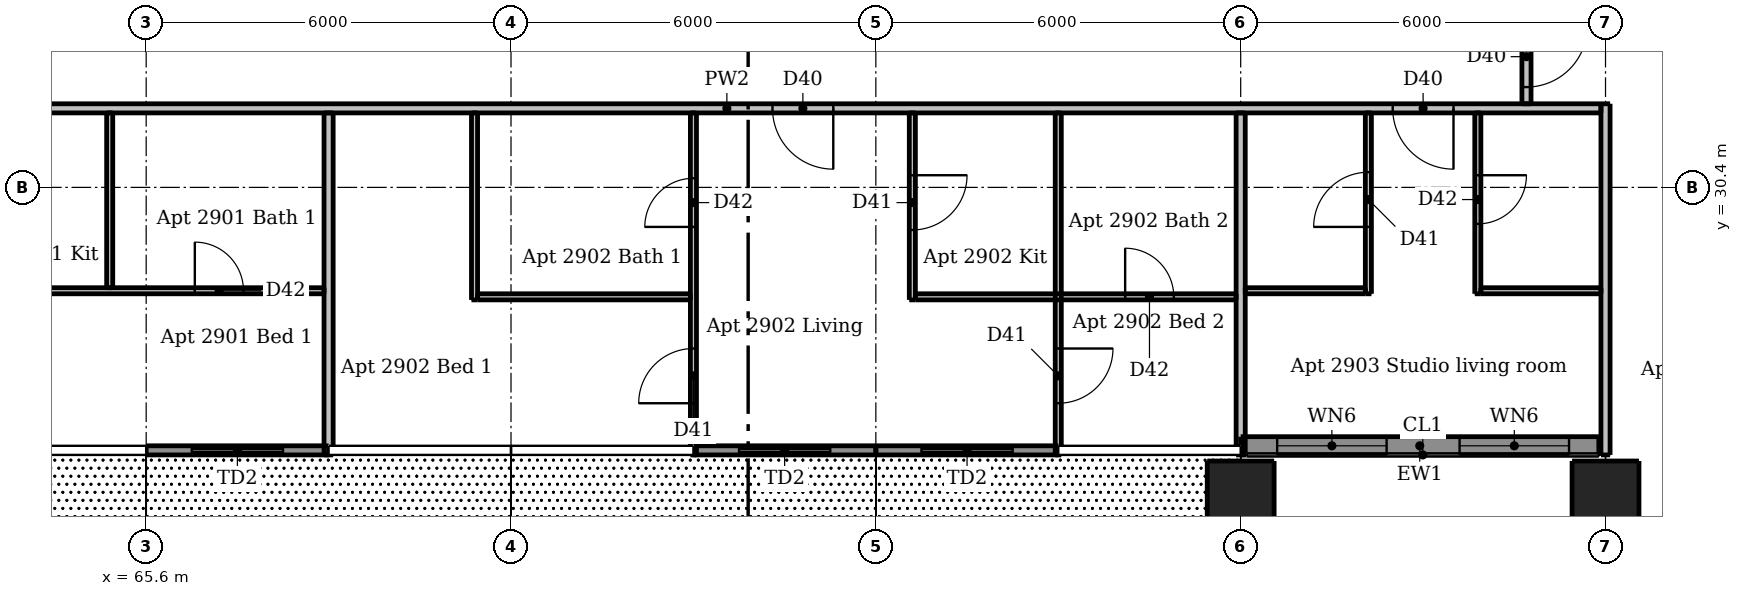
"""IFC4 building model, lengths in metres.
Left out: names, types, materials, properties, quantities, classifications, styles, units other than length and angle.
Written with IfcOpenShell. Run it as: python <this file> out.ifc"""

import sys

from ifc_helpers import new_model, si_unit, direction, frame, frame_2d, origin, origin_2d, place, context, subcontext, project, spatial, rectangle, extrude, element, fill, save


model = new_model("IFC4")
c1 = context("Model", 3, precision=1e-05, world=origin(), true_north=direction((0.0, 1.0)))
c2 = subcontext(c1, "Body", "Model", "MODEL_VIEW")
j1 = project(units=[si_unit("LENGTHUNIT", "METRE"), si_unit("PLANEANGLEUNIT", "RADIAN")], contexts=[c1])
p1 = place(None, origin())
s1 = spatial("IfcSite", under=j1, at=p1, CompositionType="ELEMENT")
p2 = place(p1, origin())
s2 = spatial("IfcBuilding", under=s1, at=p2, CompositionType="ELEMENT")
p3 = place(p2, frame((0.0, 0.0, 108.4)))
s3 = spatial("IfcBuildingStorey", under=s2, at=p3, CompositionType="ELEMENT", Elevation=108.4)
p4 = place(p3, frame((83.6, 25.35, 0.0), z_axis=(0.0, 0.0, 1.0), x_axis=(1.0, 0.0, 0.0)))
e1 = element("IfcColumn", 1, at=p4, inside=s3, PredefinedType="COLUMN", context=c2, shape_type="SweptSolid", body=[
    extrude(rectangle(XDim=1.1, YDim=1.1, at=origin_2d()), origin(), (0.0, 0.0, 1.0), 3.3),
])
p5 = place(p3, frame((89.6, 25.35, 0.0), z_axis=(0.0, 0.0, 1.0), x_axis=(1.0, 0.0, 0.0)))
e2 = element("IfcColumn", 2, at=p5, inside=s3, PredefinedType="COLUMN", context=c2, shape_type="SweptSolid", body=[
    extrude(rectangle(XDim=1.1, YDim=1.1, at=origin_2d()), origin(), (0.0, 0.0, 1.0), 3.05),
])
p6 = place(p3, frame((65.6, 26.075, 0.0), z_axis=(0.0, 0.0, 1.0), x_axis=(1.0, 0.0, 0.0)))
e3 = element("IfcWall", 3, at=p6, inside=s3, PredefinedType="SOLIDWALL", context=c2, shape_type="SweptSolid", body=[
    extrude(rectangle(XDim=3.0, YDim=0.15, at=frame_2d((1.5, 0.0))), origin(), (0.0, 0.0, 1.0), 3.05),
])
p7 = place(p6, frame((0.75, 0.0, 0.0)))
e4 = element("IfcOpeningElement", 4, at=p7, cuts=e3, PredefinedType="OPENING", context=c2, shape_type="SweptSolid", body=[
    extrude(rectangle(XDim=1.5, YDim=2.4, at=frame_2d((0.75, 1.2))), frame((0.0, 0.085, 0.0), z_axis=(0.0, -1.0, 0.0), x_axis=(1.0, 0.0, 0.0)), (0.0, 0.0, 1.0), 0.17),
])
p8 = place(p3, frame((74.6, 26.075, 0.0), z_axis=(0.0, 0.0, 1.0), x_axis=(1.0, 0.0, 0.0)))
e5 = element("IfcWall", 5, at=p8, inside=s3, PredefinedType="SOLIDWALL", context=c2, shape_type="SweptSolid", body=[
    extrude(rectangle(XDim=3.0, YDim=0.15, at=frame_2d((1.5, 0.0))), origin(), (0.0, 0.0, 1.0), 3.05),
])
p9 = place(p8, frame((0.75, 0.0, 0.0)))
e6 = element("IfcOpeningElement", 6, at=p9, cuts=e5, PredefinedType="OPENING", context=c2, shape_type="SweptSolid", body=[
    extrude(rectangle(XDim=1.5, YDim=2.4, at=frame_2d((0.75, 1.2))), frame((0.0, 0.085, 0.0), z_axis=(0.0, -1.0, 0.0), x_axis=(1.0, 0.0, 0.0)), (0.0, 0.0, 1.0), 0.17),
])
p10 = place(p3, frame((77.6, 26.075, 0.0), z_axis=(0.0, 0.0, 1.0), x_axis=(1.0, 0.0, 0.0)))
e7 = element("IfcWall", 7, at=p10, inside=s3, PredefinedType="SOLIDWALL", context=c2, shape_type="SweptSolid", body=[
    extrude(rectangle(XDim=3.0, YDim=0.15, at=frame_2d((1.5, 0.0))), origin(), (0.0, 0.0, 1.0), 3.05),
])
p11 = place(p10, frame((0.75, 0.0, 0.0)))
e8 = element("IfcOpeningElement", 8, at=p11, cuts=e7, PredefinedType="OPENING", context=c2, shape_type="SweptSolid", body=[
    extrude(rectangle(XDim=1.5, YDim=2.4, at=frame_2d((0.75, 1.2))), frame((0.0, 0.085, 0.0), z_axis=(0.0, -1.0, 0.0), x_axis=(1.0, 0.0, 0.0)), (0.0, 0.0, 1.0), 0.17),
])
p12 = place(p3, frame((83.6, 26.15, 0.0), z_axis=(0.0, 0.0, 1.0), x_axis=(1.0, 0.0, 0.0)))
e9 = element("IfcWall", 9, at=p12, inside=s3, PredefinedType="SOLIDWALL", context=c2, shape_type="SweptSolid", body=[
    extrude(rectangle(XDim=5.89, YDim=0.3, at=frame_2d((2.945, 0.0))), origin(), (0.0, 0.0, 1.0), 3.05),
])
p13 = place(p12, frame((0.6, 0.0, 0.15)))
e10 = element("IfcOpeningElement", 10, at=p13, cuts=e9, PredefinedType="OPENING", context=c2, shape_type="SweptSolid", body=[
    extrude(rectangle(XDim=1.8, YDim=2.1, at=frame_2d((0.9, 1.05))), frame((0.0, 0.16, 0.0), z_axis=(0.0, -1.0, 0.0), x_axis=(1.0, 0.0, 0.0)), (0.0, 0.0, 1.0), 0.32),
])
p14 = place(p12, frame((3.6, 0.0, 0.15)))
e11 = element("IfcOpeningElement", 11, at=p14, cuts=e9, PredefinedType="OPENING", context=c2, shape_type="SweptSolid", body=[
    extrude(rectangle(XDim=1.8, YDim=2.1, at=frame_2d((0.9, 1.05))), frame((0.0, 0.16, 0.0), z_axis=(0.0, -1.0, 0.0), x_axis=(1.0, 0.0, 0.0)), (0.0, 0.0, 1.0), 0.32),
])
p15 = place(p3, frame((65.0, 28.75, 0.0), z_axis=(0.0, 0.0, 1.0), x_axis=(0.0, 1.0, 0.0)))
e12 = element("IfcWall", 12, at=p15, inside=s3, PredefinedType="PARTITIONING", context=c2, shape_type="SweptSolid", body=[
    extrude(rectangle(XDim=2.875, YDim=0.1, at=frame_2d((1.438, 0.0))), origin(), (0.0, 0.0, 1.0), 3.05),
])
p16 = place(p3, frame((71.0, 28.55, 0.0), z_axis=(0.0, 0.0, 1.0), x_axis=(0.0, 1.0, 0.0)))
e13 = element("IfcWall", 13, at=p16, inside=s3, PredefinedType="PARTITIONING", context=c2, shape_type="SweptSolid", body=[
    extrude(rectangle(XDim=3.075, YDim=0.1, at=frame_2d((1.538, 0.0))), origin(), (0.0, 0.0, 1.0), 3.05),
])
p17 = place(p3, frame((74.6, 26.0, 0.0), z_axis=(0.0, 0.0, 1.0), x_axis=(0.0, 1.0, 0.0)))
e14 = element("IfcWall", 14, at=p17, inside=s3, PredefinedType="PARTITIONING", context=c2, shape_type="SweptSolid", body=[
    extrude(rectangle(XDim=5.625, YDim=0.1, at=frame_2d((2.812, 0.0))), origin(), (0.0, 0.0, 1.0), 3.05),
])
p18 = place(p17, frame((0.85, 0.0, 0.0)))
e15 = element("IfcOpeningElement", 15, at=p18, cuts=e14, PredefinedType="OPENING", context=c2, shape_type="SweptSolid", body=[
    extrude(rectangle(XDim=0.9, YDim=2.1, at=frame_2d((0.45, 1.05))), frame((0.0, 0.06, 0.0), z_axis=(0.0, -1.0, 0.0), x_axis=(1.0, 0.0, 0.0)), (0.0, 0.0, 1.0), 0.12),
])
p19 = place(p17, frame((3.75, 0.0, 0.0)))
e16 = element("IfcOpeningElement", 16, at=p19, cuts=e14, PredefinedType="OPENING", context=c2, shape_type="SweptSolid", body=[
    extrude(rectangle(XDim=0.8, YDim=2.1, at=frame_2d((0.4, 1.05))), frame((0.0, 0.06, 0.0), z_axis=(0.0, -1.0, 0.0), x_axis=(1.0, 0.0, 0.0)), (0.0, 0.0, 1.0), 0.12),
])
p20 = place(p3, frame((78.2, 31.625, 0.0), z_axis=(0.0, 0.0, 1.0), x_axis=(0.0, -1.0, 0.0)))
e17 = element("IfcWall", 17, at=p20, inside=s3, PredefinedType="PARTITIONING", context=c2, shape_type="SweptSolid", body=[
    extrude(rectangle(XDim=3.075, YDim=0.1, at=frame_2d((1.538, 0.0))), origin(), (0.0, 0.0, 1.0), 3.05),
])
p21 = place(p20, frame((1.025, 0.0, 0.0)))
e18 = element("IfcOpeningElement", 18, at=p21, cuts=e17, PredefinedType="OPENING", context=c2, shape_type="SweptSolid", body=[
    extrude(rectangle(XDim=0.9, YDim=2.1, at=frame_2d((0.45, 1.05))), frame((0.0, 0.06, 0.0), z_axis=(0.0, -1.0, 0.0), x_axis=(1.0, 0.0, 0.0)), (0.0, 0.0, 1.0), 0.12),
])
p22 = place(p3, frame((80.6, 31.625, 0.0), z_axis=(0.0, 0.0, 1.0), x_axis=(0.0, -1.0, 0.0)))
e19 = element("IfcWall", 19, at=p22, inside=s3, PredefinedType="PARTITIONING", context=c2, shape_type="SweptSolid", body=[
    extrude(rectangle(XDim=5.625, YDim=0.1, at=frame_2d((2.812, 0.0))), origin(), (0.0, 0.0, 1.0), 3.05),
])
p23 = place(p22, frame((3.875, 0.0, 0.0)))
e20 = element("IfcOpeningElement", 20, at=p23, cuts=e19, PredefinedType="OPENING", context=c2, shape_type="SweptSolid", body=[
    extrude(rectangle(XDim=0.9, YDim=2.1, at=frame_2d((0.45, 1.05))), frame((0.0, 0.06, 0.0), z_axis=(0.0, -1.0, 0.0), x_axis=(1.0, 0.0, 0.0)), (0.0, 0.0, 1.0), 0.12),
])
p24 = place(p3, frame((85.7, 28.65, 0.0), z_axis=(0.0, 0.0, 1.0), x_axis=(0.0, 1.0, 0.0)))
e21 = element("IfcWall", 21, at=p24, inside=s3, PredefinedType="PARTITIONING", context=c2, shape_type="SweptSolid", body=[
    extrude(rectangle(XDim=2.975, YDim=0.1, at=frame_2d((1.488, 0.0))), origin(), (0.0, 0.0, 1.0), 3.05),
])
p25 = place(p24, frame((1.1, 0.0, 0.0)))
e22 = element("IfcOpeningElement", 22, at=p25, cuts=e21, PredefinedType="OPENING", context=c2, shape_type="SweptSolid", body=[
    extrude(rectangle(XDim=0.9, YDim=2.1, at=frame_2d((0.45, 1.05))), frame((0.0, 0.06, 0.0), z_axis=(0.0, -1.0, 0.0), x_axis=(1.0, 0.0, 0.0)), (0.0, 0.0, 1.0), 0.12),
])
p26 = place(p3, frame((87.5, 31.625, 0.0), z_axis=(0.0, 0.0, 1.0), x_axis=(0.0, -1.0, 0.0)))
e23 = element("IfcWall", 23, at=p26, inside=s3, PredefinedType="PARTITIONING", context=c2, shape_type="SweptSolid", body=[
    extrude(rectangle(XDim=2.975, YDim=0.1, at=frame_2d((1.488, 0.0))), origin(), (0.0, 0.0, 1.0), 3.05),
])
p27 = place(p26, frame((1.025, 0.0, 0.0)))
e24 = element("IfcOpeningElement", 24, at=p27, cuts=e23, PredefinedType="OPENING", context=c2, shape_type="SweptSolid", body=[
    extrude(rectangle(XDim=0.8, YDim=2.1, at=frame_2d((0.4, 1.05))), frame((0.0, 0.06, 0.0), z_axis=(0.0, -1.0, 0.0), x_axis=(1.0, 0.0, 0.0)), (0.0, 0.0, 1.0), 0.12),
])
p28 = place(p3, frame((62.65, 28.7, 0.0), z_axis=(0.0, 0.0, 1.0), x_axis=(1.0, 0.0, 0.0)))
e25 = element("IfcWall", 25, at=p28, inside=s3, PredefinedType="PARTITIONING", context=c2, shape_type="SweptSolid", body=[
    extrude(rectangle(XDim=5.875, YDim=0.1, at=frame_2d((2.938, 0.0))), origin(), (0.0, 0.0, 1.0), 3.05),
])
p29 = place(p28, frame((3.75, 0.0, 0.0)))
e26 = element("IfcOpeningElement", 26, at=p29, cuts=e25, PredefinedType="OPENING", context=c2, shape_type="SweptSolid", body=[
    extrude(rectangle(XDim=0.8, YDim=2.1, at=frame_2d((0.4, 1.05))), frame((0.0, 0.06, 0.0), z_axis=(0.0, -1.0, 0.0), x_axis=(1.0, 0.0, 0.0)), (0.0, 0.0, 1.0), 0.12),
])
for number, where, z_axis, x_axis in (
    (27, (83.675, 28.7, 0.0), (0.0, 0.0, 1.0), (1.0, 0.0, 0.0)),
    (28, (87.55, 28.7, 0.0), (0.0, 0.0, 1.0), (1.0, 0.0, 0.0)),
):
    element("IfcWall", number, at=place(p3, frame(where, z_axis=z_axis, x_axis=x_axis)), inside=s3, PredefinedType="PARTITIONING", context=c2, shape_type="SweptSolid", body=[
        extrude(rectangle(XDim=1.975, YDim=0.1, at=frame_2d((0.987, 0.0))), origin(), (0.0, 0.0, 1.0), 3.05),
    ])
p30 = place(p3, frame((71.05, 28.6, 0.0), z_axis=(0.0, 0.0, 1.0), x_axis=(1.0, 0.0, 0.0)))
e29 = element("IfcWall", 29, at=p30, inside=s3, PredefinedType="PARTITIONING", context=c2, shape_type="SweptSolid", body=[
    extrude(rectangle(XDim=3.5, YDim=0.1, at=frame_2d((1.75, 0.0))), origin(), (0.0, 0.0, 1.0), 3.05),
])
p31 = place(p3, frame((78.25, 28.6, 0.0), z_axis=(0.0, 0.0, 1.0), x_axis=(1.0, 0.0, 0.0)))
e30 = element("IfcWall", 30, at=p31, inside=s3, PredefinedType="PARTITIONING", context=c2, shape_type="SweptSolid", body=[
    extrude(rectangle(XDim=5.275, YDim=0.1, at=frame_2d((2.637, 0.0))), origin(), (0.0, 0.0, 1.0), 3.05),
])
p32 = place(p31, frame((3.45, 0.0, 0.0)))
e31 = element("IfcOpeningElement", 31, at=p32, cuts=e30, PredefinedType="OPENING", context=c2, shape_type="SweptSolid", body=[
    extrude(rectangle(XDim=0.8, YDim=2.1, at=frame_2d((0.4, 1.05))), frame((0.0, 0.06, 0.0), z_axis=(0.0, -1.0, 0.0), x_axis=(1.0, 0.0, 0.0)), (0.0, 0.0, 1.0), 0.12),
])
p33 = place(p3, frame((68.6, 26.0, 0.0), z_axis=(0.0, 0.0, 1.0), x_axis=(0.0, 1.0, 0.0)))
e32 = element("IfcWall", 32, at=p33, inside=s3, PredefinedType="PARTITIONING", context=c2, shape_type="SweptSolid", body=[
    extrude(rectangle(XDim=5.625, YDim=0.15, at=frame_2d((2.812, 0.0))), origin(), (0.0, 0.0, 1.0), 3.05),
])
p34 = place(p3, frame((83.6, 26.0, 0.0), z_axis=(0.0, 0.0, 1.0), x_axis=(0.0, 1.0, 0.0)))
e33 = element("IfcWall", 33, at=p34, inside=s3, PredefinedType="PARTITIONING", context=c2, shape_type="SweptSolid", body=[
    extrude(rectangle(XDim=5.625, YDim=0.15, at=frame_2d((2.812, 0.0))), origin(), (0.0, 0.0, 1.0), 2.59),
])
p35 = place(p3, frame((88.3, 60.475, 0.0), z_axis=(0.0, 0.0, 1.0), x_axis=(0.0, -1.0, 0.0)))
e34 = element("IfcWall", 34, at=p35, inside=s3, PredefinedType="PARTITIONING", context=c2, shape_type="SweptSolid", body=[
    extrude(rectangle(XDim=28.7, YDim=0.15, at=frame_2d((14.35, 0.0))), origin(), (0.0, 0.0, 1.0), 3.05),
])
p36 = place(p35, frame((27.425, 0.0, 0.0)))
e35 = element("IfcOpeningElement", 35, at=p36, cuts=e34, PredefinedType="OPENING", context=c2, shape_type="SweptSolid", body=[
    extrude(rectangle(XDim=1.0, YDim=2.1, at=frame_2d((0.5, 1.05))), frame((0.0, 0.085, 0.0), z_axis=(0.0, -1.0, 0.0), x_axis=(1.0, 0.0, 0.0)), (0.0, 0.0, 1.0), 0.17),
])
p37 = place(p35, frame((14.575, 0.0, 0.0)))
e36 = element("IfcOpeningElement", 36, at=p37, cuts=e34, PredefinedType="OPENING", context=c2, shape_type="SweptSolid", body=[
    extrude(rectangle(XDim=1.0, YDim=2.1, at=frame_2d((0.5, 1.05))), frame((0.0, 0.085, 0.0), z_axis=(0.0, -1.0, 0.0), x_axis=(1.0, 0.0, 0.0)), (0.0, 0.0, 1.0), 0.17),
])
p38 = place(p35, frame((2.575, 0.0, 0.0)))
e37 = element("IfcOpeningElement", 37, at=p38, cuts=e34, PredefinedType="OPENING", context=c2, shape_type="SweptSolid", body=[
    extrude(rectangle(XDim=1.0, YDim=2.1, at=frame_2d((0.5, 1.05))), frame((0.0, 0.085, 0.0), z_axis=(0.0, -1.0, 0.0), x_axis=(1.0, 0.0, 0.0)), (0.0, 0.0, 1.0), 0.17),
])
p39 = place(p3, frame((89.6, 26.0, 0.0), z_axis=(0.0, 0.0, 1.0), x_axis=(0.0, 1.0, 0.0)))
e38 = element("IfcWall", 38, at=p39, inside=s3, PredefinedType="PARTITIONING", context=c2, shape_type="SweptSolid", body=[
    extrude(rectangle(XDim=5.775, YDim=0.15, at=frame_2d((2.887, 0.0))), origin(), (0.0, 0.0, 1.0), 2.516),
])
p40 = place(p3, frame((89.525, 31.7, 0.0), z_axis=(0.0, 0.0, 1.0), x_axis=(-1.0, 0.0, 0.0)))
e39 = element("IfcWall", 39, at=p40, inside=s3, PredefinedType="PARTITIONING", context=c2, shape_type="SweptSolid", body=[
    extrude(rectangle(XDim=28.75, YDim=0.15, at=frame_2d((14.375, 0.0))), origin(), (0.0, 0.0, 1.0), 3.05),
])
p41 = place(p40, frame((27.375, 0.0, 0.0)))
e40 = element("IfcOpeningElement", 40, at=p41, cuts=e39, PredefinedType="OPENING", context=c2, shape_type="SweptSolid", body=[
    extrude(rectangle(XDim=1.0, YDim=2.1, at=frame_2d((0.5, 1.05))), frame((0.0, 0.085, 0.0), z_axis=(0.0, -1.0, 0.0), x_axis=(1.0, 0.0, 0.0)), (0.0, 0.0, 1.0), 0.17),
])
p42 = place(p40, frame((12.625, 0.0, 0.0)))
e41 = element("IfcOpeningElement", 41, at=p42, cuts=e39, PredefinedType="OPENING", context=c2, shape_type="SweptSolid", body=[
    extrude(rectangle(XDim=1.0, YDim=2.1, at=frame_2d((0.5, 1.05))), frame((0.0, 0.085, 0.0), z_axis=(0.0, -1.0, 0.0), x_axis=(1.0, 0.0, 0.0)), (0.0, 0.0, 1.0), 0.17),
])
p43 = place(p40, frame((2.425, 0.0, 0.0)))
e42 = element("IfcOpeningElement", 42, at=p43, cuts=e39, PredefinedType="OPENING", context=c2, shape_type="SweptSolid", body=[
    extrude(rectangle(XDim=1.0, YDim=2.1, at=frame_2d((0.5, 1.05))), frame((0.0, 0.085, 0.0), z_axis=(0.0, -1.0, 0.0), x_axis=(1.0, 0.0, 0.0)), (0.0, 0.0, 1.0), 0.17),
])
p44 = place(p7, origin())
e43 = element("IfcDoor", 43, at=p44, inside=s3, OperationType="DOUBLE_DOOR_SLIDING", PredefinedType="DOOR", context=c2, shape_type="SweptSolid", body=[
    extrude(rectangle(XDim=1.5, YDim=2.4, at=frame_2d((0.75, 1.2))), frame((0.0, 0.025, 0.0), z_axis=(0.0, -1.0, 0.0), x_axis=(1.0, 0.0, 0.0)), (0.0, 0.0, 1.0), 0.05),
])
fill(e4, e43)
p45 = place(p9, origin())
e44 = element("IfcDoor", 44, at=p45, inside=s3, OperationType="DOUBLE_DOOR_SLIDING", PredefinedType="DOOR", context=c2, shape_type="SweptSolid", body=[
    extrude(rectangle(XDim=1.5, YDim=2.4, at=frame_2d((0.75, 1.2))), frame((0.0, 0.025, 0.0), z_axis=(0.0, -1.0, 0.0), x_axis=(1.0, 0.0, 0.0)), (0.0, 0.0, 1.0), 0.05),
])
fill(e6, e44)
p46 = place(p11, origin())
e45 = element("IfcDoor", 45, at=p46, inside=s3, OperationType="DOUBLE_DOOR_SLIDING", PredefinedType="DOOR", context=c2, shape_type="SweptSolid", body=[
    extrude(rectangle(XDim=1.5, YDim=2.4, at=frame_2d((0.75, 1.2))), frame((0.0, 0.025, 0.0), z_axis=(0.0, -1.0, 0.0), x_axis=(1.0, 0.0, 0.0)), (0.0, 0.0, 1.0), 0.05),
])
fill(e8, e45)
p47 = place(p13, origin())
e46 = element("IfcWindow", 46, at=p47, inside=s3, PartitioningType="DOUBLE_PANEL_VERTICAL", PredefinedType="WINDOW", context=c2, shape_type="SweptSolid", body=[
    extrude(rectangle(XDim=1.8, YDim=2.1, at=frame_2d((0.9, 1.05))), frame((0.0, 0.03, 0.0), z_axis=(0.0, -1.0, 0.0), x_axis=(1.0, 0.0, 0.0)), (0.0, 0.0, 1.0), 0.06),
])
fill(e10, e46)
p48 = place(p14, origin())
e47 = element("IfcWindow", 47, at=p48, inside=s3, PartitioningType="DOUBLE_PANEL_VERTICAL", PredefinedType="WINDOW", context=c2, shape_type="SweptSolid", body=[
    extrude(rectangle(XDim=1.8, YDim=2.1, at=frame_2d((0.9, 1.05))), frame((0.0, 0.03, 0.0), z_axis=(0.0, -1.0, 0.0), x_axis=(1.0, 0.0, 0.0)), (0.0, 0.0, 1.0), 0.06),
])
fill(e11, e47)
p49 = place(p29, origin())
e48 = element("IfcDoor", 48, at=p49, inside=s3, OperationType="SINGLE_SWING_LEFT", PredefinedType="DOOR", context=c2, shape_type="SweptSolid", body=[
    extrude(rectangle(XDim=0.8, YDim=2.1, at=frame_2d((0.4, 1.05))), frame((0.0, 0.025, 0.0), z_axis=(0.0, -1.0, 0.0), x_axis=(1.0, 0.0, 0.0)), (0.0, 0.0, 1.0), 0.05),
])
fill(e26, e48)
p50 = place(p42, origin())
e49 = element("IfcDoor", 49, at=p50, inside=s3, OperationType="SINGLE_SWING_LEFT", PredefinedType="DOOR", context=c2, shape_type="SweptSolid", body=[
    extrude(rectangle(XDim=1.0, YDim=2.1, at=frame_2d((0.5, 1.05))), frame((0.0, 0.025, 0.0), z_axis=(0.0, -1.0, 0.0), x_axis=(1.0, 0.0, 0.0)), (0.0, 0.0, 1.0), 0.05),
])
fill(e41, e49)
p51 = place(p21, origin())
e50 = element("IfcDoor", 50, at=p51, inside=s3, OperationType="SINGLE_SWING_LEFT", PredefinedType="DOOR", context=c2, shape_type="SweptSolid", body=[
    extrude(rectangle(XDim=0.9, YDim=2.1, at=frame_2d((0.45, 1.05))), frame((0.0, 0.025, 0.0), z_axis=(0.0, -1.0, 0.0), x_axis=(1.0, 0.0, 0.0)), (0.0, 0.0, 1.0), 0.05),
])
fill(e18, e50)
p52 = place(p18, origin())
e51 = element("IfcDoor", 51, at=p52, inside=s3, OperationType="SINGLE_SWING_LEFT", PredefinedType="DOOR", context=c2, shape_type="SweptSolid", body=[
    extrude(rectangle(XDim=0.9, YDim=2.1, at=frame_2d((0.45, 1.05))), frame((0.0, 0.025, 0.0), z_axis=(0.0, -1.0, 0.0), x_axis=(1.0, 0.0, 0.0)), (0.0, 0.0, 1.0), 0.05),
])
fill(e15, e51)
p53 = place(p19, origin())
e52 = element("IfcDoor", 52, at=p53, inside=s3, OperationType="SINGLE_SWING_LEFT", PredefinedType="DOOR", context=c2, shape_type="SweptSolid", body=[
    extrude(rectangle(XDim=0.8, YDim=2.1, at=frame_2d((0.4, 1.05))), frame((0.0, 0.025, 0.0), z_axis=(0.0, -1.0, 0.0), x_axis=(1.0, 0.0, 0.0)), (0.0, 0.0, 1.0), 0.05),
])
fill(e16, e52)
p54 = place(p23, origin())
e53 = element("IfcDoor", 53, at=p54, inside=s3, OperationType="SINGLE_SWING_LEFT", PredefinedType="DOOR", context=c2, shape_type="SweptSolid", body=[
    extrude(rectangle(XDim=0.9, YDim=2.1, at=frame_2d((0.45, 1.05))), frame((0.0, 0.025, 0.0), z_axis=(0.0, -1.0, 0.0), x_axis=(1.0, 0.0, 0.0)), (0.0, 0.0, 1.0), 0.05),
])
fill(e20, e53)
p55 = place(p32, origin())
e54 = element("IfcDoor", 54, at=p55, inside=s3, OperationType="SINGLE_SWING_LEFT", PredefinedType="DOOR", context=c2, shape_type="SweptSolid", body=[
    extrude(rectangle(XDim=0.8, YDim=2.1, at=frame_2d((0.4, 1.05))), frame((0.0, 0.025, 0.0), z_axis=(0.0, -1.0, 0.0), x_axis=(1.0, 0.0, 0.0)), (0.0, 0.0, 1.0), 0.05),
])
fill(e31, e54)
p56 = place(p43, origin())
e55 = element("IfcDoor", 55, at=p56, inside=s3, OperationType="SINGLE_SWING_LEFT", PredefinedType="DOOR", context=c2, shape_type="SweptSolid", body=[
    extrude(rectangle(XDim=1.0, YDim=2.1, at=frame_2d((0.5, 1.05))), frame((0.0, 0.025, 0.0), z_axis=(0.0, -1.0, 0.0), x_axis=(1.0, 0.0, 0.0)), (0.0, 0.0, 1.0), 0.05),
])
fill(e42, e55)
p57 = place(p25, origin())
e56 = element("IfcDoor", 56, at=p57, inside=s3, OperationType="SINGLE_SWING_LEFT", PredefinedType="DOOR", context=c2, shape_type="SweptSolid", body=[
    extrude(rectangle(XDim=0.9, YDim=2.1, at=frame_2d((0.45, 1.05))), frame((0.0, 0.025, 0.0), z_axis=(0.0, -1.0, 0.0), x_axis=(1.0, 0.0, 0.0)), (0.0, 0.0, 1.0), 0.05),
])
fill(e22, e56)
p58 = place(p27, origin())
e57 = element("IfcDoor", 57, at=p58, inside=s3, OperationType="SINGLE_SWING_LEFT", PredefinedType="DOOR", context=c2, shape_type="SweptSolid", body=[
    extrude(rectangle(XDim=0.8, YDim=2.1, at=frame_2d((0.4, 1.05))), frame((0.0, 0.025, 0.0), z_axis=(0.0, -1.0, 0.0), x_axis=(1.0, 0.0, 0.0)), (0.0, 0.0, 1.0), 0.05),
])
fill(e24, e57)
p59 = place(p36, origin())
e58 = element("IfcDoor", 58, at=p59, inside=s3, OperationType="SINGLE_SWING_LEFT", PredefinedType="DOOR", context=c2, shape_type="SweptSolid", body=[
    extrude(rectangle(XDim=1.0, YDim=2.1, at=frame_2d((0.5, 1.05))), frame((0.0, 0.025, 0.0), z_axis=(0.0, -1.0, 0.0), x_axis=(1.0, 0.0, 0.0)), (0.0, 0.0, 1.0), 0.05),
])
fill(e35, e58)
save(model, sys.argv[1])
